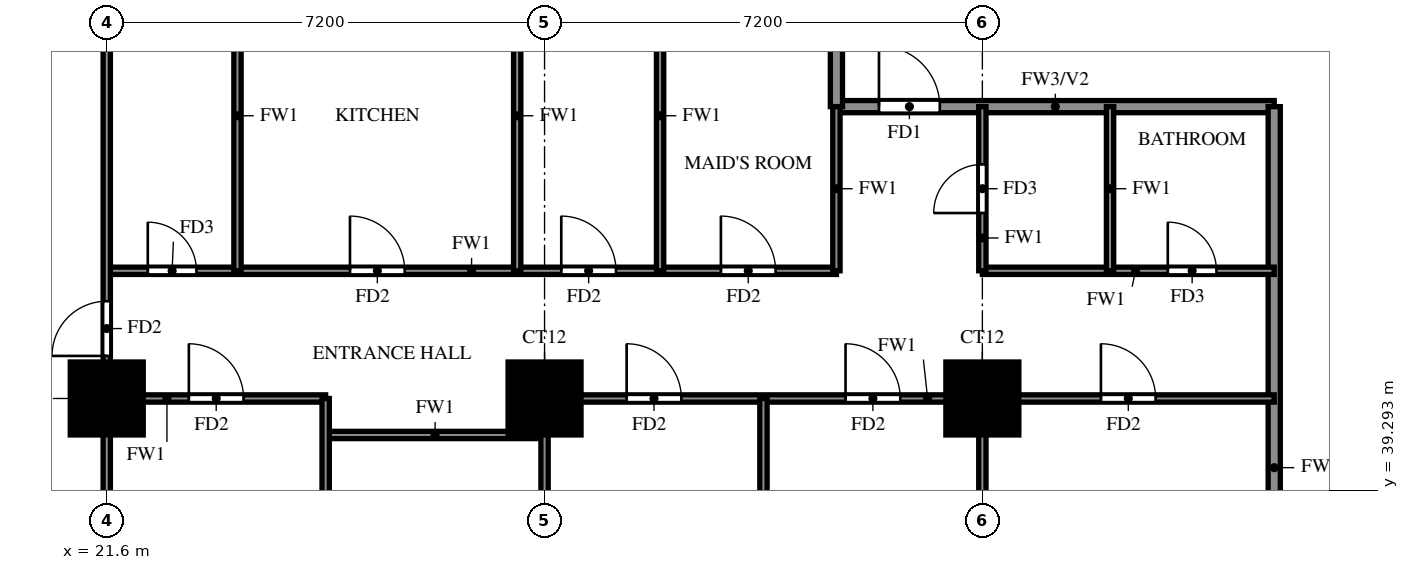
"""IFC4 building model, lengths in metres.
Left out: names, types, materials, properties, quantities, classifications, styles, units other than length and angle.
Written with IfcOpenShell. Run it as: python <this file> out.ifc"""

import sys

from ifc_helpers import new_model, si_unit, direction, frame, frame_2d, origin, origin_2d, place, context, subcontext, project, spatial, rectangle, extrude, source, transform, mapped, element, fill, save


model = new_model("IFC4")
c1 = context("Model", 3, precision=1e-05, world=origin(), true_north=direction((0.0, 1.0)))
c2 = subcontext(c1, "Body", "Model", "MODEL_VIEW")
j1 = project(units=[si_unit("LENGTHUNIT", "METRE"), si_unit("PLANEANGLEUNIT", "RADIAN")], contexts=[c1])
p1 = place(None, origin())
s1 = spatial("IfcSite", under=j1, at=p1, CompositionType="ELEMENT")
p2 = place(p1, origin())
s2 = spatial("IfcBuilding", under=s1, at=p2, CompositionType="ELEMENT")
p3 = place(p2, frame((0.0, 0.0, 97.0)))
s3 = spatial("IfcBuildingStorey", under=s2, at=p3, CompositionType="ELEMENT", Elevation=97.0)
m1 = source(origin(), c2, "Body", "SweptSolid", [
    extrude(rectangle(XDim=1.2, YDim=1.2, at=origin_2d()), origin(), (0.0, 0.0, 1.0), 3.18),
])
for number, where, z_axis, x_axis in (
    (1, (21.6, 40.8, 0.0), (0.0, 0.0, 1.0), (1.0, 0.0, 0.0)),
    (2, (28.8, 40.8, 0.0), (0.0, 0.0, 1.0), (1.0, 0.0, 0.0)),
    (3, (36.0, 40.8, 0.0), (0.0, 0.0, 1.0), (1.0, 0.0, 0.0)),
):
    element("IfcColumn", number, at=place(p3, frame(where, z_axis=z_axis, x_axis=x_axis)), inside=s3, PredefinedType="COLUMN", context=c2, shape_type="MappedRepresentation", body=[
        mapped(m1, transform((0.0, 0.0, 0.0))),
    ])
p4 = place(p3, frame((33.6, 45.6, 0.0), z_axis=(0.0, 0.0, 1.0), x_axis=(1.0, 0.0, 0.0)))
e4 = element("IfcWall", 4, at=p4, inside=s3, PredefinedType="SOLIDWALL", context=c2, shape_type="SweptSolid", body=[
    extrude(rectangle(XDim=7.2, YDim=0.2, at=frame_2d((3.6, 0.0))), origin(), (0.0, 0.0, 1.0), 3.18),
])
p5 = place(p4, frame((0.7, 0.0, 0.0)))
e5 = element("IfcOpeningElement", 5, at=p5, cuts=e4, PredefinedType="OPENING", context=c2, shape_type="SweptSolid", body=[
    extrude(rectangle(XDim=1.0, YDim=2.1, at=frame_2d((0.5, 1.05))), frame((0.0, 0.11, 0.0), z_axis=(0.0, -1.0, 0.0), x_axis=(1.0, 0.0, 0.0)), (0.0, 0.0, 1.0), 0.22),
])
p6 = place(p3, frame((33.6, 45.6, 0.0), z_axis=(0.0, 0.0, 1.0), x_axis=(0.0, 1.0, 0.0)))
e6 = element("IfcWall", 6, at=p6, inside=s3, PredefinedType="SOLIDWALL", context=c2, shape_type="SweptSolid", body=[
    extrude(rectangle(XDim=8.4, YDim=0.2, at=frame_2d((4.2, 0.0))), origin(), (0.0, 0.0, 1.0), 3.18),
])
p7 = place(p3, frame((40.8, 33.725, 0.0), z_axis=(0.0, 0.0, 1.0), x_axis=(0.0, 1.0, 0.0)))
e7 = element("IfcWall", 7, at=p7, inside=s3, PredefinedType="SOLIDWALL", context=c2, shape_type="SweptSolid", body=[
    extrude(rectangle(XDim=11.875, YDim=0.2, at=frame_2d((5.938, 0.0))), origin(), (0.0, 0.0, 1.0), 2.28),
])
p8 = place(p3, frame((25.2, 40.2, 0.0), z_axis=(0.0, 0.0, 1.0), x_axis=(1.0, 0.0, 0.0)))
e8 = element("IfcWall", 8, at=p8, inside=s3, PredefinedType="PARTITIONING", context=c2, shape_type="SweptSolid", body=[
    extrude(rectangle(XDim=3.6, YDim=0.12, at=frame_2d((1.8, 0.0))), origin(), (0.0, 0.0, 1.0), 3.18),
])
p9 = place(p3, frame((21.6, 40.8, 0.0), z_axis=(0.0, 0.0, 1.0), x_axis=(1.0, 0.0, 0.0)))
e9 = element("IfcWall", 9, at=p9, inside=s3, PredefinedType="PARTITIONING", context=c2, shape_type="SweptSolid", body=[
    extrude(rectangle(XDim=3.6, YDim=0.12, at=frame_2d((1.8, 0.0))), origin(), (0.0, 0.0, 1.0), 3.18),
])
p10 = place(p9, frame((1.35, 0.0, 0.0)))
e10 = element("IfcOpeningElement", 10, at=p10, cuts=e9, PredefinedType="OPENING", context=c2, shape_type="SweptSolid", body=[
    extrude(rectangle(XDim=0.9, YDim=2.1, at=frame_2d((0.45, 1.05))), frame((0.0, 0.07, 0.0), z_axis=(0.0, -1.0, 0.0), x_axis=(1.0, 0.0, 0.0)), (0.0, 0.0, 1.0), 0.14),
])
p11 = place(p3, frame((28.8, 40.8, 0.0), z_axis=(0.0, 0.0, 1.0), x_axis=(1.0, 0.0, 0.0)))
e11 = element("IfcWall", 11, at=p11, inside=s3, PredefinedType="PARTITIONING", context=c2, shape_type="SweptSolid", body=[
    extrude(rectangle(XDim=12.0, YDim=0.12, at=frame_2d((6.0, 0.0))), origin(), (0.0, 0.0, 1.0), 3.18),
])
p12 = place(p11, frame((1.35, 0.0, 0.0)))
e12 = element("IfcOpeningElement", 12, at=p12, cuts=e11, PredefinedType="OPENING", context=c2, shape_type="SweptSolid", body=[
    extrude(rectangle(XDim=0.9, YDim=2.1, at=frame_2d((0.45, 1.05))), frame((0.0, 0.07, 0.0), z_axis=(0.0, -1.0, 0.0), x_axis=(1.0, 0.0, 0.0)), (0.0, 0.0, 1.0), 0.14),
])
p13 = place(p11, frame((4.95, 0.0, 0.0)))
e13 = element("IfcOpeningElement", 13, at=p13, cuts=e11, PredefinedType="OPENING", context=c2, shape_type="SweptSolid", body=[
    extrude(rectangle(XDim=0.9, YDim=2.1, at=frame_2d((0.45, 1.05))), frame((0.0, 0.07, 0.0), z_axis=(0.0, -1.0, 0.0), x_axis=(1.0, 0.0, 0.0)), (0.0, 0.0, 1.0), 0.14),
])
p14 = place(p11, frame((9.15, 0.0, 0.0)))
e14 = element("IfcOpeningElement", 14, at=p14, cuts=e11, PredefinedType="OPENING", context=c2, shape_type="SweptSolid", body=[
    extrude(rectangle(XDim=0.9, YDim=2.1, at=frame_2d((0.45, 1.05))), frame((0.0, 0.07, 0.0), z_axis=(0.0, -1.0, 0.0), x_axis=(1.0, 0.0, 0.0)), (0.0, 0.0, 1.0), 0.14),
])
p15 = place(p3, frame((21.6, 42.9, 0.0), z_axis=(0.0, 0.0, 1.0), x_axis=(1.0, 0.0, 0.0)))
e15 = element("IfcWall", 15, at=p15, inside=s3, PredefinedType="PARTITIONING", context=c2, shape_type="SweptSolid", body=[
    extrude(rectangle(XDim=12.0, YDim=0.12, at=frame_2d((6.0, 0.0))), origin(), (0.0, 0.0, 1.0), 3.18),
])
p16 = place(p15, frame((0.675, 0.0, 0.0)))
e16 = element("IfcOpeningElement", 16, at=p16, cuts=e15, PredefinedType="OPENING", context=c2, shape_type="SweptSolid", body=[
    extrude(rectangle(XDim=0.8, YDim=2.1, at=frame_2d((0.4, 1.05))), frame((0.0, 0.07, 0.0), z_axis=(0.0, -1.0, 0.0), x_axis=(1.0, 0.0, 0.0)), (0.0, 0.0, 1.0), 0.14),
])
p17 = place(p15, frame((4.0, 0.0, 0.0)))
e17 = element("IfcOpeningElement", 17, at=p17, cuts=e15, PredefinedType="OPENING", context=c2, shape_type="SweptSolid", body=[
    extrude(rectangle(XDim=0.9, YDim=2.1, at=frame_2d((0.45, 1.05))), frame((0.0, 0.07, 0.0), z_axis=(0.0, -1.0, 0.0), x_axis=(1.0, 0.0, 0.0)), (0.0, 0.0, 1.0), 0.14),
])
p18 = place(p15, frame((7.475, 0.0, 0.0)))
e18 = element("IfcOpeningElement", 18, at=p18, cuts=e15, PredefinedType="OPENING", context=c2, shape_type="SweptSolid", body=[
    extrude(rectangle(XDim=0.9, YDim=2.1, at=frame_2d((0.45, 1.05))), frame((0.0, 0.07, 0.0), z_axis=(0.0, -1.0, 0.0), x_axis=(1.0, 0.0, 0.0)), (0.0, 0.0, 1.0), 0.14),
])
p19 = place(p15, frame((10.1, 0.0, 0.0)))
e19 = element("IfcOpeningElement", 19, at=p19, cuts=e15, PredefinedType="OPENING", context=c2, shape_type="SweptSolid", body=[
    extrude(rectangle(XDim=0.9, YDim=2.1, at=frame_2d((0.45, 1.05))), frame((0.0, 0.07, 0.0), z_axis=(0.0, -1.0, 0.0), x_axis=(1.0, 0.0, 0.0)), (0.0, 0.0, 1.0), 0.14),
])
p20 = place(p3, frame((36.0, 42.9, 0.0), z_axis=(0.0, 0.0, 1.0), x_axis=(1.0, 0.0, 0.0)))
e20 = element("IfcWall", 20, at=p20, inside=s3, PredefinedType="PARTITIONING", context=c2, shape_type="SweptSolid", body=[
    extrude(rectangle(XDim=4.8, YDim=0.12, at=frame_2d((2.4, 0.0))), origin(), (0.0, 0.0, 1.0), 3.18),
])
p21 = place(p20, frame((3.05, 0.0, 0.0)))
e21 = element("IfcOpeningElement", 21, at=p21, cuts=e20, PredefinedType="OPENING", context=c2, shape_type="SweptSolid", body=[
    extrude(rectangle(XDim=0.8, YDim=2.1, at=frame_2d((0.4, 1.05))), frame((0.0, 0.07, 0.0), z_axis=(0.0, -1.0, 0.0), x_axis=(1.0, 0.0, 0.0)), (0.0, 0.0, 1.0), 0.14),
])
p22 = place(p3, frame((21.6, 33.725, 0.0), z_axis=(0.0, 0.0, 1.0), x_axis=(0.0, 1.0, 0.0)))
e22 = element("IfcWall", 22, at=p22, inside=s3, PredefinedType="PARTITIONING", context=c2, shape_type="SweptSolid", body=[
    extrude(rectangle(XDim=28.675, YDim=0.12, at=frame_2d((14.337, 0.0))), origin(), (0.0, 0.0, 1.0), 3.18),
])
p23 = place(p22, frame((7.775, 0.0, 0.0)))
e23 = element("IfcOpeningElement", 23, at=p23, cuts=e22, PredefinedType="OPENING", context=c2, shape_type="SweptSolid", body=[
    extrude(rectangle(XDim=0.9, YDim=2.1, at=frame_2d((0.45, 1.05))), frame((0.0, 0.07, 0.0), z_axis=(0.0, -1.0, 0.0), x_axis=(1.0, 0.0, 0.0)), (0.0, 0.0, 1.0), 0.14),
])
p24 = place(p22, frame((17.125, 0.0, 0.0)))
e24 = element("IfcOpeningElement", 24, at=p24, cuts=e22, PredefinedType="OPENING", context=c2, shape_type="SweptSolid", body=[
    extrude(rectangle(XDim=1.5, YDim=2.1, at=frame_2d((0.75, 1.05))), frame((0.0, 0.07, 0.0), z_axis=(0.0, -1.0, 0.0), x_axis=(1.0, 0.0, 0.0)), (0.0, 0.0, 1.0), 0.14),
])
p25 = place(p22, frame((22.825, 0.0, 0.0)))
e25 = element("IfcOpeningElement", 25, at=p25, cuts=e22, PredefinedType="OPENING", context=c2, shape_type="SweptSolid", body=[
    extrude(rectangle(XDim=0.9, YDim=2.1, at=frame_2d((0.45, 1.05))), frame((0.0, 0.07, 0.0), z_axis=(0.0, -1.0, 0.0), x_axis=(1.0, 0.0, 0.0)), (0.0, 0.0, 1.0), 0.14),
])
p26 = place(p22, frame((26.425, 0.0, 0.0)))
e26 = element("IfcOpeningElement", 26, at=p26, cuts=e22, PredefinedType="OPENING", context=c2, shape_type="SweptSolid", body=[
    extrude(rectangle(XDim=0.9, YDim=2.1, at=frame_2d((0.45, 1.05))), frame((0.0, 0.07, 0.0), z_axis=(0.0, -1.0, 0.0), x_axis=(1.0, 0.0, 0.0)), (0.0, 0.0, 1.0), 0.14),
])
p27 = place(p3, frame((23.75, 42.9, 0.0), z_axis=(0.0, 0.0, 1.0), x_axis=(0.0, 1.0, 0.0)))
e27 = element("IfcWall", 27, at=p27, inside=s3, PredefinedType="PARTITIONING", context=c2, shape_type="SweptSolid", body=[
    extrude(rectangle(XDim=5.1, YDim=0.12, at=frame_2d((2.55, 0.0))), origin(), (0.0, 0.0, 1.0), 3.18),
])
p28 = place(p3, frame((25.2, 33.725, 0.0), z_axis=(0.0, 0.0, 1.0), x_axis=(0.0, 1.0, 0.0)))
e28 = element("IfcWall", 28, at=p28, inside=s3, PredefinedType="PARTITIONING", context=c2, shape_type="SweptSolid", body=[
    extrude(rectangle(XDim=7.075, YDim=0.12, at=frame_2d((3.538, 0.0))), origin(), (0.0, 0.0, 1.0), 2.28),
])
p29 = place(p28, frame((2.837, 0.0, 0.0)))
e29 = element("IfcOpeningElement", 29, at=p29, cuts=e28, PredefinedType="OPENING", context=c2, shape_type="SweptSolid", body=[
    extrude(rectangle(XDim=0.8, YDim=2.1, at=frame_2d((0.4, 1.05))), frame((0.0, 0.07, 0.0), z_axis=(0.0, -1.0, 0.0), x_axis=(1.0, 0.0, 0.0)), (0.0, 0.0, 1.0), 0.14),
])
p30 = place(p3, frame((28.35, 42.9, 0.0), z_axis=(0.0, 0.0, 1.0), x_axis=(0.0, 1.0, 0.0)))
e30 = element("IfcWall", 30, at=p30, inside=s3, PredefinedType="PARTITIONING", context=c2, shape_type="SweptSolid", body=[
    extrude(rectangle(XDim=5.1, YDim=0.12, at=frame_2d((2.55, 0.0))), origin(), (0.0, 0.0, 1.0), 3.18),
])
p31 = place(p3, frame((28.8, 33.725, 0.0), z_axis=(0.0, 0.0, 1.0), x_axis=(0.0, 1.0, 0.0)))
e31 = element("IfcWall", 31, at=p31, inside=s3, PredefinedType="PARTITIONING", context=c2, shape_type="SweptSolid", body=[
    extrude(rectangle(XDim=7.075, YDim=0.12, at=frame_2d((3.538, 0.0))), origin(), (0.0, 0.0, 1.0), 3.18),
])
p32 = place(p3, frame((30.7, 42.9, 0.0), z_axis=(0.0, 0.0, 1.0), x_axis=(0.0, 1.0, 0.0)))
e32 = element("IfcWall", 32, at=p32, inside=s3, PredefinedType="PARTITIONING", context=c2, shape_type="SweptSolid", body=[
    extrude(rectangle(XDim=5.1, YDim=0.12, at=frame_2d((2.55, 0.0))), origin(), (0.0, 0.0, 1.0), 3.18),
])
p33 = place(p3, frame((32.4, 33.725, 0.0), z_axis=(0.0, 0.0, 1.0), x_axis=(0.0, 1.0, 0.0)))
e33 = element("IfcWall", 33, at=p33, inside=s3, PredefinedType="PARTITIONING", context=c2, shape_type="SweptSolid", body=[
    extrude(rectangle(XDim=7.075, YDim=0.12, at=frame_2d((3.538, 0.0))), origin(), (0.0, 0.0, 1.0), 2.28),
])
p34 = place(p3, frame((33.6, 42.9, 0.0), z_axis=(0.0, 0.0, 1.0), x_axis=(0.0, 1.0, 0.0)))
e34 = element("IfcWall", 34, at=p34, inside=s3, PredefinedType="PARTITIONING", context=c2, shape_type="SweptSolid", body=[
    extrude(rectangle(XDim=2.7, YDim=0.12, at=frame_2d((1.35, 0.0))), origin(), (0.0, 0.0, 1.0), 3.18),
])
p35 = place(p3, frame((36.0, 33.725, 0.0), z_axis=(0.0, 0.0, 1.0), x_axis=(0.0, 1.0, 0.0)))
e35 = element("IfcWall", 35, at=p35, inside=s3, PredefinedType="PARTITIONING", context=c2, shape_type="SweptSolid", body=[
    extrude(rectangle(XDim=7.075, YDim=0.12, at=frame_2d((3.538, 0.0))), origin(), (0.0, 0.0, 1.0), 3.18),
])
p36 = place(p3, frame((36.0, 42.9, 0.0), z_axis=(0.0, 0.0, 1.0), x_axis=(0.0, 1.0, 0.0)))
e36 = element("IfcWall", 36, at=p36, inside=s3, PredefinedType="PARTITIONING", context=c2, shape_type="SweptSolid", body=[
    extrude(rectangle(XDim=2.7, YDim=0.12, at=frame_2d((1.35, 0.0))), origin(), (0.0, 0.0, 1.0), 3.18),
])
p37 = place(p36, frame((0.95, 0.0, 0.0)))
e37 = element("IfcOpeningElement", 37, at=p37, cuts=e36, PredefinedType="OPENING", context=c2, shape_type="SweptSolid", body=[
    extrude(rectangle(XDim=0.8, YDim=2.1, at=frame_2d((0.4, 1.05))), frame((0.0, 0.07, 0.0), z_axis=(0.0, -1.0, 0.0), x_axis=(1.0, 0.0, 0.0)), (0.0, 0.0, 1.0), 0.14),
])
p38 = place(p3, frame((38.1, 42.9, 0.0), z_axis=(0.0, 0.0, 1.0), x_axis=(0.0, 1.0, 0.0)))
e38 = element("IfcWall", 38, at=p38, inside=s3, PredefinedType="PARTITIONING", context=c2, shape_type="SweptSolid", body=[
    extrude(rectangle(XDim=2.7, YDim=0.12, at=frame_2d((1.35, 0.0))), origin(), (0.0, 0.0, 1.0), 3.18),
])
p39 = place(p5, origin())
e39 = element("IfcDoor", 39, at=p39, inside=s3, OperationType="SINGLE_SWING_LEFT", PredefinedType="DOOR", context=c2, shape_type="SweptSolid", body=[
    extrude(rectangle(XDim=1.0, YDim=2.1, at=frame_2d((0.5, 1.05))), frame((0.0, 0.025, 0.0), z_axis=(0.0, -1.0, 0.0), x_axis=(1.0, 0.0, 0.0)), (0.0, 0.0, 1.0), 0.05),
])
fill(e5, e39)
p40 = place(p23, origin())
e40 = element("IfcDoor", 40, at=p40, inside=s3, OperationType="SINGLE_SWING_RIGHT", PredefinedType="DOOR", context=c2, shape_type="SweptSolid", body=[
    extrude(rectangle(XDim=0.9, YDim=2.1, at=frame_2d((0.45, 1.05))), frame((0.0, 0.025, 0.0), z_axis=(0.0, -1.0, 0.0), x_axis=(1.0, 0.0, 0.0)), (0.0, 0.0, 1.0), 0.05),
])
fill(e23, e40)
p41 = place(p10, origin())
e41 = element("IfcDoor", 41, at=p41, inside=s3, OperationType="SINGLE_SWING_RIGHT", PredefinedType="DOOR", context=c2, shape_type="SweptSolid", body=[
    extrude(rectangle(XDim=0.9, YDim=2.1, at=frame_2d((0.45, 1.05))), frame((0.0, 0.025, 0.0), z_axis=(0.0, -1.0, 0.0), x_axis=(1.0, 0.0, 0.0)), (0.0, 0.0, 1.0), 0.05),
])
fill(e10, e41)
p42 = place(p12, origin())
e42 = element("IfcDoor", 42, at=p42, inside=s3, OperationType="SINGLE_SWING_LEFT", PredefinedType="DOOR", context=c2, shape_type="SweptSolid", body=[
    extrude(rectangle(XDim=0.9, YDim=2.1, at=frame_2d((0.45, 1.05))), frame((0.0, 0.025, 0.0), z_axis=(0.0, -1.0, 0.0), x_axis=(1.0, 0.0, 0.0)), (0.0, 0.0, 1.0), 0.05),
])
fill(e12, e42)
p43 = place(p13, origin())
e43 = element("IfcDoor", 43, at=p43, inside=s3, OperationType="SINGLE_SWING_RIGHT", PredefinedType="DOOR", context=c2, shape_type="SweptSolid", body=[
    extrude(rectangle(XDim=0.9, YDim=2.1, at=frame_2d((0.45, 1.05))), frame((0.0, 0.025, 0.0), z_axis=(0.0, -1.0, 0.0), x_axis=(1.0, 0.0, 0.0)), (0.0, 0.0, 1.0), 0.05),
])
fill(e13, e43)
p44 = place(p14, origin())
e44 = element("IfcDoor", 44, at=p44, inside=s3, OperationType="SINGLE_SWING_LEFT", PredefinedType="DOOR", context=c2, shape_type="SweptSolid", body=[
    extrude(rectangle(XDim=0.9, YDim=2.1, at=frame_2d((0.45, 1.05))), frame((0.0, 0.025, 0.0), z_axis=(0.0, -1.0, 0.0), x_axis=(1.0, 0.0, 0.0)), (0.0, 0.0, 1.0), 0.05),
])
fill(e14, e44)
p45 = place(p16, origin())
e45 = element("IfcDoor", 45, at=p45, inside=s3, OperationType="SINGLE_SWING_LEFT", PredefinedType="DOOR", context=c2, shape_type="SweptSolid", body=[
    extrude(rectangle(XDim=0.8, YDim=2.1, at=frame_2d((0.4, 1.05))), frame((0.0, 0.025, 0.0), z_axis=(0.0, -1.0, 0.0), x_axis=(1.0, 0.0, 0.0)), (0.0, 0.0, 1.0), 0.05),
])
fill(e16, e45)
p46 = place(p17, origin())
e46 = element("IfcDoor", 46, at=p46, inside=s3, OperationType="SINGLE_SWING_RIGHT", PredefinedType="DOOR", context=c2, shape_type="SweptSolid", body=[
    extrude(rectangle(XDim=0.9, YDim=2.1, at=frame_2d((0.45, 1.05))), frame((0.0, 0.025, 0.0), z_axis=(0.0, -1.0, 0.0), x_axis=(1.0, 0.0, 0.0)), (0.0, 0.0, 1.0), 0.05),
])
fill(e17, e46)
p47 = place(p18, origin())
e47 = element("IfcDoor", 47, at=p47, inside=s3, OperationType="SINGLE_SWING_LEFT", PredefinedType="DOOR", context=c2, shape_type="SweptSolid", body=[
    extrude(rectangle(XDim=0.9, YDim=2.1, at=frame_2d((0.45, 1.05))), frame((0.0, 0.025, 0.0), z_axis=(0.0, -1.0, 0.0), x_axis=(1.0, 0.0, 0.0)), (0.0, 0.0, 1.0), 0.05),
])
fill(e18, e47)
p48 = place(p19, origin())
e48 = element("IfcDoor", 48, at=p48, inside=s3, OperationType="SINGLE_SWING_LEFT", PredefinedType="DOOR", context=c2, shape_type="SweptSolid", body=[
    extrude(rectangle(XDim=0.9, YDim=2.1, at=frame_2d((0.45, 1.05))), frame((0.0, 0.025, 0.0), z_axis=(0.0, -1.0, 0.0), x_axis=(1.0, 0.0, 0.0)), (0.0, 0.0, 1.0), 0.05),
])
fill(e19, e48)
p49 = place(p37, origin())
e49 = element("IfcDoor", 49, at=p49, inside=s3, OperationType="SINGLE_SWING_RIGHT", PredefinedType="DOOR", context=c2, shape_type="SweptSolid", body=[
    extrude(rectangle(XDim=0.8, YDim=2.1, at=frame_2d((0.4, 1.05))), frame((0.0, 0.025, 0.0), z_axis=(0.0, -1.0, 0.0), x_axis=(1.0, 0.0, 0.0)), (0.0, 0.0, 1.0), 0.05),
])
fill(e37, e49)
p50 = place(p21, origin())
e50 = element("IfcDoor", 50, at=p50, inside=s3, OperationType="SINGLE_SWING_LEFT", PredefinedType="DOOR", context=c2, shape_type="SweptSolid", body=[
    extrude(rectangle(XDim=0.8, YDim=2.1, at=frame_2d((0.4, 1.05))), frame((0.0, 0.025, 0.0), z_axis=(0.0, -1.0, 0.0), x_axis=(1.0, 0.0, 0.0)), (0.0, 0.0, 1.0), 0.05),
])
fill(e21, e50)
save(model, sys.argv[1])
